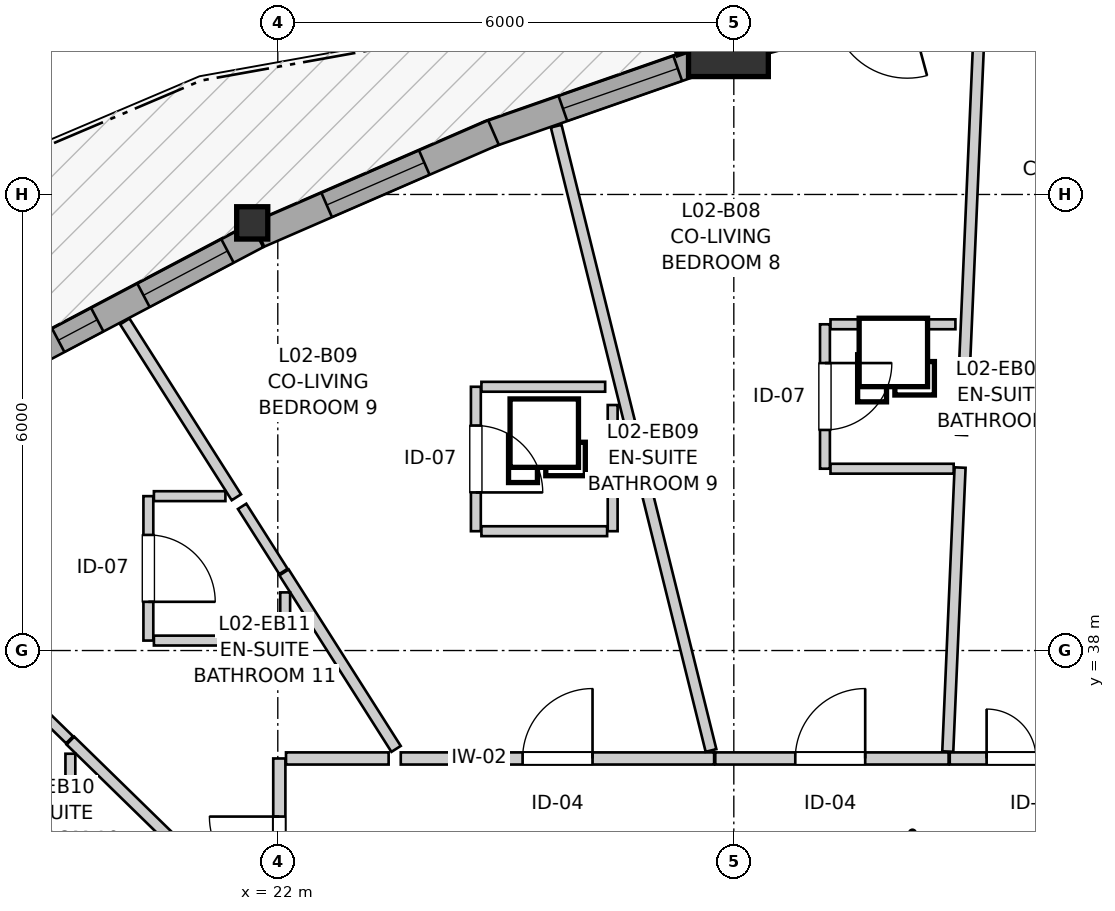
"""IFC4 building model, lengths in metres.
Left out: names, types, materials, properties, quantities, classifications, styles, units other than length and angle.
Written with IfcOpenShell. Run it as: python <this file> out.ifc"""

import sys

from ifc_helpers import new_model, si_unit, direction, frame, frame_2d, origin, origin_2d, place, context, subcontext, project, spatial, rectangle, i_section, extrude, source, transform, mapped, element, fill, save


model = new_model("IFC4")
c1 = context("Model", 3, precision=1e-05, world=origin(), true_north=direction((0.0, 1.0)))
c2 = subcontext(c1, "Body", "Model", "MODEL_VIEW")
j1 = project(units=[si_unit("LENGTHUNIT", "METRE"), si_unit("PLANEANGLEUNIT", "RADIAN")], contexts=[c1])
p1 = place(None, origin())
s1 = spatial("IfcSite", under=j1, at=p1, CompositionType="ELEMENT")
p2 = place(p1, origin())
s2 = spatial("IfcBuilding", under=s1, at=p2, CompositionType="ELEMENT")
p3 = place(p2, frame((0.0, 0.0, 11.0)))
s3 = spatial("IfcBuildingStorey", under=s2, at=p3, CompositionType="ELEMENT", Elevation=11.0)
m1 = source(origin(), c2, "Body", "SweptSolid", [
    extrude(rectangle(XDim=1.05, YDim=1.05, at=origin_2d()), origin(), (0.0, 0.0, 1.0), 2.94),
])
p4 = place(p3, frame((27.929, 46.076, 0.0), z_axis=(0.0, 0.0, 1.0), x_axis=(1.0, 0.0, 0.0)))
e1 = element("IfcColumn", 1, at=p4, inside=s3, PredefinedType="COLUMN", context=c2, shape_type="MappedRepresentation", body=[
    mapped(m1, transform((0.0, 0.0, 0.0), x_axis=(1.0, 0.0, 0.0), y_axis=(0.0, 1.0, 0.0), z_axis=(0.0, 0.0, 1.0), scale=1.0)),
])
m2 = source(origin(), c2, "Body", "SweptSolid", [
    extrude(i_section(OverallWidth=0.409, OverallDepth=0.425, WebThickness=0.03, FlangeThickness=0.048, FilletRadius=0.015, at=origin_2d()), origin(), (0.0, 0.0, 1.0), 2.94),
])
p5 = place(p3, frame((21.664, 43.626, 0.0), z_axis=(0.0, 0.0, 1.0), x_axis=(1.0, 0.0, 0.0)))
e2 = element("IfcColumn", 2, at=p5, inside=s3, PredefinedType="PILASTER", context=c2, shape_type="MappedRepresentation", body=[
    mapped(m2, transform((0.0, 0.0, 0.0), x_axis=(1.0, 0.0, 0.0), y_axis=(0.0, 1.0, 0.0), z_axis=(0.0, 0.0, 1.0), scale=1.0)),
])
p6 = place(p3, frame((31.333, 46.814, 0.0), z_axis=(0.0, 0.0, 1.0), x_axis=(-0.965456905924, -0.260562780926, 0.0)))
e3 = element("IfcWall", 3, at=p6, inside=s3, PredefinedType="SOLIDWALL", context=c2, shape_type="SweptSolid", body=[
    extrude(rectangle(XDim=3.179, YDim=0.35, at=frame_2d((1.59, 0.0))), origin(), (0.0, 0.0, 1.0), 2.42),
])
p7 = place(p6, frame((1.09, 0.0, 0.0)))
e4 = element("IfcOpeningElement", 4, at=p7, cuts=e3, PredefinedType="OPENING", context=c2, shape_type="SweptSolid", body=[
    extrude(rectangle(XDim=1.0, YDim=2.1, at=frame_2d((0.5, 1.05))), frame((0.0, 0.185, 0.0), z_axis=(0.0, -1.0, 0.0), x_axis=(1.0, 0.0, 0.0)), (0.0, 0.0, 1.0), 0.37),
])
p8 = place(p3, frame((27.703, 45.812, 0.0), z_axis=(0.0, 0.0, 1.0), x_axis=(-0.944149283204, -0.329518028377, 0.0)))
e5 = element("IfcWall", 5, at=p8, inside=s3, PredefinedType="SOLIDWALL", context=c2, shape_type="SweptSolid", body=[
    extrude(rectangle(XDim=3.123, YDim=0.35, at=frame_2d((1.562, 0.0))), origin(), (0.0, 0.0, 1.0), 2.42),
])
p9 = place(p8, frame((0.468, 0.0, 0.82)))
e6 = element("IfcOpeningElement", 6, at=p9, cuts=e5, PredefinedType="OPENING", context=c2, shape_type="SweptSolid", body=[
    extrude(rectangle(XDim=1.6, YDim=1.35, at=frame_2d((0.8, 0.675))), frame((0.0, 0.185, 0.0), z_axis=(0.0, -1.0, 0.0), x_axis=(1.0, 0.0, 0.0)), (0.0, 0.0, 1.0), 0.37),
])
p10 = place(p3, frame((24.838, 44.815, 0.0), z_axis=(0.0, 0.0, 1.0), x_axis=(-0.917087357706, -0.398686315712, 0.0)))
e7 = element("IfcWall", 7, at=p10, inside=s3, PredefinedType="SOLIDWALL", context=c2, shape_type="SweptSolid", body=[
    extrude(rectangle(XDim=3.365, YDim=0.35, at=frame_2d((1.683, 0.0))), origin(), (0.0, 0.0, 1.0), 2.42),
])
p11 = place(p10, frame((0.992, 0.0, 0.82)))
e8 = element("IfcOpeningElement", 8, at=p11, cuts=e7, PredefinedType="OPENING", context=c2, shape_type="SweptSolid", body=[
    extrude(rectangle(XDim=1.4, YDim=1.35, at=frame_2d((0.7, 0.675))), frame((0.0, 0.185, 0.0), z_axis=(0.0, -1.0, 0.0), x_axis=(1.0, 0.0, 0.0)), (0.0, 0.0, 1.0), 0.37),
])
p12 = place(p3, frame((21.728, 43.462, 0.0), z_axis=(0.0, 0.0, 1.0), x_axis=(-0.884404833282, -0.466720570435, 0.0)))
e9 = element("IfcWall", 9, at=p12, inside=s3, PredefinedType="SOLIDWALL", context=c2, shape_type="SweptSolid", body=[
    extrude(rectangle(XDim=3.346, YDim=0.35, at=frame_2d((1.673, 0.0))), origin(), (0.0, 0.0, 1.0), 2.42),
])
p13 = place(p12, frame((0.44, 0.0, 0.82)))
e10 = element("IfcOpeningElement", 10, at=p13, cuts=e9, PredefinedType="OPENING", context=c2, shape_type="SweptSolid", body=[
    extrude(rectangle(XDim=1.25, YDim=1.35, at=frame_2d((0.625, 0.675))), frame((0.0, 0.185, 0.0), z_axis=(0.0, -1.0, 0.0), x_axis=(1.0, 0.0, 0.0)), (0.0, 0.0, 1.0), 0.37),
])
p14 = place(p12, frame((2.378, 0.0, 0.82)))
e11 = element("IfcOpeningElement", 11, at=p14, cuts=e9, PredefinedType="OPENING", context=c2, shape_type="SweptSolid", body=[
    extrude(rectangle(XDim=0.58, YDim=1.35, at=frame_2d((0.29, 0.675))), frame((0.0, 0.185, 0.0), z_axis=(0.0, -1.0, 0.0), x_axis=(1.0, 0.0, 0.0)), (0.0, 0.0, 1.0), 0.37),
])
p15 = place(p3, frame((23.618, 36.58, 0.0), z_axis=(0.0, 0.0, 1.0), x_axis=(1.0, 0.0, 0.0)))
e12 = element("IfcWall", 12, at=p15, inside=s3, PredefinedType="PARTITIONING", context=c2, shape_type="SweptSolid", body=[
    extrude(rectangle(XDim=4.123, YDim=0.16, at=frame_2d((2.062, 0.0))), origin(), (0.0, 0.0, 1.0), 2.548),
])
p16 = place(p15, frame((1.603, 0.0, 0.0)))
e13 = element("IfcOpeningElement", 13, at=p16, cuts=e12, PredefinedType="OPENING", context=c2, shape_type="SweptSolid", body=[
    extrude(rectangle(XDim=0.92, YDim=2.1, at=frame_2d((0.46, 1.05))), frame((0.0, 0.09, 0.0), z_axis=(0.0, -1.0, 0.0), x_axis=(1.0, 0.0, 0.0)), (0.0, 0.0, 1.0), 0.18),
])
p17 = place(p3, frame((27.756, 36.58, 0.0), z_axis=(0.0, 0.0, 1.0), x_axis=(1.0, 0.0, 0.0)))
e14 = element("IfcWall", 14, at=p17, inside=s3, PredefinedType="PARTITIONING", context=c2, shape_type="SweptSolid", body=[
    extrude(rectangle(XDim=3.07, YDim=0.16, at=frame_2d((1.535, 0.0))), origin(), (0.0, 0.0, 1.0), 2.94),
])
p18 = place(p17, frame((1.052, 0.0, 0.0)))
e15 = element("IfcOpeningElement", 15, at=p18, cuts=e14, PredefinedType="OPENING", context=c2, shape_type="SweptSolid", body=[
    extrude(rectangle(XDim=0.92, YDim=2.1, at=frame_2d((0.46, 1.05))), frame((0.0, 0.09, 0.0), z_axis=(0.0, -1.0, 0.0), x_axis=(1.0, 0.0, 0.0)), (0.0, 0.0, 1.0), 0.18),
])
p19 = place(p3, frame((22.02, 34.167, 0.0), z_axis=(0.0, 0.0, 1.0), x_axis=(0.0, 1.0, 0.0)))
e16 = element("IfcWall", 16, at=p19, inside=s3, PredefinedType="PARTITIONING", context=c2, shape_type="SweptSolid", body=[
    extrude(rectangle(XDim=2.413, YDim=0.16, at=frame_2d((1.207, 0.0))), origin(), (0.0, 0.0, 1.0), 2.94),
])
p20 = place(p19, frame((0.729, 0.0, 0.0)))
e17 = element("IfcOpeningElement", 17, at=p20, cuts=e16, PredefinedType="OPENING", context=c2, shape_type="SweptSolid", body=[
    extrude(rectangle(XDim=0.92, YDim=2.1, at=frame_2d((0.46, 1.05))), frame((0.0, 0.09, 0.0), z_axis=(0.0, -1.0, 0.0), x_axis=(1.0, 0.0, 0.0)), (0.0, 0.0, 1.0), 0.18),
])
p21 = place(p3, frame((30.841, 36.58, 0.0), z_axis=(0.0, 0.0, 1.0), x_axis=(1.0, 0.0, 0.0)))
e18 = element("IfcWall", 18, at=p21, inside=s3, PredefinedType="PARTITIONING", context=c2, shape_type="SweptSolid", body=[
    extrude(rectangle(XDim=2.316, YDim=0.16, at=frame_2d((1.158, 0.0))), origin(), (0.0, 0.0, 1.0), 2.94),
])
p22 = place(p21, frame((0.485, 0.0, 0.0)))
e19 = element("IfcOpeningElement", 19, at=p22, cuts=e18, PredefinedType="OPENING", context=c2, shape_type="SweptSolid", body=[
    extrude(rectangle(XDim=1.3, YDim=2.1, at=frame_2d((0.65, 1.05))), frame((0.0, 0.09, 0.0), z_axis=(0.0, -1.0, 0.0), x_axis=(1.0, 0.0, 0.0)), (0.0, 0.0, 1.0), 0.18),
])
p23 = place(p3, frame((29.199, 42.292, 0.0), z_axis=(0.0, 0.0, 1.0), x_axis=(0.0, -1.0, 0.0)))
e20 = element("IfcWall", 20, at=p23, inside=s3, PredefinedType="PARTITIONING", context=c2, shape_type="SweptSolid", body=[
    extrude(rectangle(XDim=1.9, YDim=0.13, at=frame_2d((0.95, 0.0))), origin(), (0.0, 0.0, 1.0), 2.94),
])
p24 = place(p23, frame((0.51, 0.0, 0.0)))
e21 = element("IfcOpeningElement", 21, at=p24, cuts=e20, PredefinedType="OPENING", context=c2, shape_type="SweptSolid", body=[
    extrude(rectangle(XDim=0.88, YDim=2.05, at=frame_2d((0.44, 1.025))), frame((0.0, 0.075, 0.0), z_axis=(0.0, -1.0, 0.0), x_axis=(1.0, 0.0, 0.0)), (0.0, 0.0, 1.0), 0.15),
])
p25 = place(p3, frame((24.606, 41.47, 0.0), z_axis=(0.0, 0.0, 1.0), x_axis=(0.0, -1.0, 0.0)))
e22 = element("IfcWall", 22, at=p25, inside=s3, PredefinedType="PARTITIONING", context=c2, shape_type="SweptSolid", body=[
    extrude(rectangle(XDim=1.9, YDim=0.13, at=frame_2d((0.95, 0.0))), origin(), (0.0, 0.0, 1.0), 2.94),
])
p26 = place(p25, frame((0.51, 0.0, 0.0)))
e23 = element("IfcOpeningElement", 23, at=p26, cuts=e22, PredefinedType="OPENING", context=c2, shape_type="SweptSolid", body=[
    extrude(rectangle(XDim=0.88, YDim=2.05, at=frame_2d((0.44, 1.025))), frame((0.0, 0.075, 0.0), z_axis=(0.0, -1.0, 0.0), x_axis=(1.0, 0.0, 0.0)), (0.0, 0.0, 1.0), 0.15),
])
p27 = place(p3, frame((20.297, 40.031, 0.0), z_axis=(0.0, 0.0, 1.0), x_axis=(0.0, -1.0, 0.0)))
e24 = element("IfcWall", 24, at=p27, inside=s3, PredefinedType="PARTITIONING", context=c2, shape_type="SweptSolid", body=[
    extrude(rectangle(XDim=1.9, YDim=0.13, at=frame_2d((0.95, 0.0))), origin(), (0.0, 0.0, 1.0), 2.94),
])
p28 = place(p27, frame((0.51, 0.0, 0.0)))
e25 = element("IfcOpeningElement", 25, at=p28, cuts=e24, PredefinedType="OPENING", context=c2, shape_type="SweptSolid", body=[
    extrude(rectangle(XDim=0.88, YDim=2.05, at=frame_2d((0.44, 1.025))), frame((0.0, 0.075, 0.0), z_axis=(0.0, -1.0, 0.0), x_axis=(1.0, 0.0, 0.0)), (0.0, 0.0, 1.0), 0.15),
])
p29 = place(p3, frame((12.829, 37.479, 0.0), z_axis=(0.0, 0.0, 1.0), x_axis=(0.836435846472, -0.548064845376, 0.0)))
e26 = element("IfcWall", 26, at=p29, inside=s3, PredefinedType="PARTITIONING", context=c2, shape_type="SweptSolid", body=[
    extrude(rectangle(XDim=10.838, YDim=0.145, at=frame_2d((5.419, 0.0))), origin(), (0.0, 0.0, 1.0), 2.94),
])
p30 = place(p3, frame((25.663, 44.899, 0.0), z_axis=(0.0, 0.0, 1.0), x_axis=(0.240695577024, -0.970600658974, 0.0)))
e27 = element("IfcWall", 27, at=p30, inside=s3, PredefinedType="PARTITIONING", context=c2, shape_type="SweptSolid", body=[
    extrude(rectangle(XDim=8.462, YDim=0.145, at=frame_2d((4.231, 0.0))), origin(), (0.0, 0.0, 1.0), 2.94),
])
p31 = place(p3, frame((30.996, 40.836, 0.0), z_axis=(0.0, 0.0, 1.0), x_axis=(0.043354544378, 0.999059749706, 0.0)))
e28 = element("IfcWall", 28, at=p31, inside=s3, PredefinedType="PARTITIONING", context=c2, shape_type="SweptSolid", body=[
    extrude(rectangle(XDim=5.766, YDim=0.145, at=frame_2d((2.883, 0.0))), origin(), (0.0, 0.0, 1.0), 2.94),
])
p32 = place(p3, frame((19.271, 36.815, 0.0), z_axis=(0.0, 0.0, 1.0), x_axis=(0.71551452036, -0.698597860828, 0.0)))
e29 = element("IfcWall", 29, at=p32, inside=s3, PredefinedType="PARTITIONING", context=c2, shape_type="SweptSolid", body=[
    extrude(rectangle(XDim=3.651, YDim=0.145, at=frame_2d((1.826, 0.0))), origin(), (0.0, 0.0, 1.0), 2.308),
])
p33 = place(p3, frame((30.815, 36.671, 0.0), z_axis=(0.0, 0.0, 1.0), x_axis=(0.043352224588, 0.999059850371, 0.0)))
e30 = element("IfcWall", 30, at=p33, inside=s3, PredefinedType="PARTITIONING", context=c2, shape_type="SweptSolid", body=[
    extrude(rectangle(XDim=3.739, YDim=0.145, at=frame_2d((1.87, 0.0))), origin(), (0.0, 0.0, 1.0), 2.94),
])
p34 = place(p3, frame((22.082, 39.028, 0.0), z_axis=(0.0, 0.0, 1.0), x_axis=(0.535944885386, -0.844252971465, 0.0)))
e31 = element("IfcWall", 31, at=p34, inside=s3, PredefinedType="PARTITIONING", context=c2, shape_type="SweptSolid", body=[
    extrude(rectangle(XDim=2.751, YDim=0.145, at=frame_2d((1.375, 0.0))), origin(), (0.0, 0.0, 1.0), 2.94),
])
p35 = place(p3, frame((19.987, 42.33, 0.0), z_axis=(0.0, 0.0, 1.0), x_axis=(0.535808561115, -0.844339496788, 0.0)))
e32 = element("IfcWall", 32, at=p35, inside=s3, PredefinedType="PARTITIONING", context=c2, shape_type="SweptSolid", body=[
    extrude(rectangle(XDim=2.74, YDim=0.145, at=frame_2d((1.37, 0.0))), origin(), (0.0, 0.0, 1.0), 2.94),
])
p36 = place(p3, frame((26.406, 39.57, 0.0), z_axis=(0.0, 0.0, 1.0), x_axis=(0.0, 1.0, 0.0)))
e33 = element("IfcWall", 33, at=p36, inside=s3, PredefinedType="PARTITIONING", context=c2, shape_type="SweptSolid", body=[
    extrude(rectangle(XDim=1.66, YDim=0.13, at=frame_2d((0.83, 0.0))), origin(), (0.0, 0.0, 1.0), 2.94),
])
p37 = place(p3, frame((17.544, 36.125, 0.0), z_axis=(0.0, 0.0, 1.0), x_axis=(1.0, 0.0, 0.0)))
e34 = element("IfcWall", 34, at=p37, inside=s3, PredefinedType="PARTITIONING", context=c2, shape_type="SweptSolid", body=[
    extrude(rectangle(XDim=1.727, YDim=0.13, at=frame_2d((0.864, 0.0))), origin(), (0.0, 0.0, 1.0), 2.94),
])
p38 = place(p3, frame((20.37, 38.131, 0.0), z_axis=(0.0, 0.0, 1.0), x_axis=(1.0, 0.0, 0.0)))
e35 = element("IfcWall", 35, at=p38, inside=s3, PredefinedType="PARTITIONING", context=c2, shape_type="SweptSolid", body=[
    extrude(rectangle(XDim=1.727, YDim=0.13, at=frame_2d((0.863, 0.0))), origin(), (0.0, 0.0, 1.0), 2.94),
])
p39 = place(p3, frame((29.272, 42.292, 0.0), z_axis=(0.0, 0.0, 1.0), x_axis=(1.0, 0.0, 0.0)))
e36 = element("IfcWall", 36, at=p39, inside=s3, PredefinedType="PARTITIONING", context=c2, shape_type="SweptSolid", body=[
    extrude(rectangle(XDim=1.644, YDim=0.13, at=frame_2d((0.822, 0.0))), origin(), (0.0, 0.0, 1.0), 2.508),
])
p40 = place(p3, frame((24.679, 41.47, 0.0), z_axis=(0.0, 0.0, 1.0), x_axis=(1.0, 0.0, 0.0)))
e37 = element("IfcWall", 37, at=p40, inside=s3, PredefinedType="PARTITIONING", context=c2, shape_type="SweptSolid", body=[
    extrude(rectangle(XDim=1.628, YDim=0.13, at=frame_2d((0.814, 0.0))), origin(), (0.0, 0.0, 1.0), 2.508),
])
p41 = place(p3, frame((24.679, 39.57, 0.0), z_axis=(0.0, 0.0, 1.0), x_axis=(1.0, 0.0, 0.0)))
e38 = element("IfcWall", 38, at=p41, inside=s3, PredefinedType="PARTITIONING", context=c2, shape_type="SweptSolid", body=[
    extrude(rectangle(XDim=1.654, YDim=0.13, at=frame_2d((0.827, 0.0))), origin(), (0.0, 0.0, 1.0), 2.94),
])
p42 = place(p3, frame((29.272, 40.392, 0.0), z_axis=(0.0, 0.0, 1.0), x_axis=(1.0, 0.0, 0.0)))
e39 = element("IfcWall", 39, at=p42, inside=s3, PredefinedType="PARTITIONING", context=c2, shape_type="SweptSolid", body=[
    extrude(rectangle(XDim=1.621, YDim=0.13, at=frame_2d((0.81, 0.0))), origin(), (0.0, 0.0, 1.0), 2.94),
])
p43 = place(p3, frame((18.042, 38.014, 0.0), z_axis=(0.0, 0.0, 1.0), x_axis=(0.715729497461, -0.698377610225, 0.0)))
e40 = element("IfcWall", 40, at=p43, inside=s3, PredefinedType="PARTITIONING", context=c2, shape_type="SweptSolid", body=[
    extrude(rectangle(XDim=1.702, YDim=0.13, at=frame_2d((0.851, 0.0))), origin(), (0.0, 0.0, 1.0), 2.308),
])
p44 = place(p3, frame((22.108, 36.58, 0.0), z_axis=(0.0, 0.0, 1.0), x_axis=(1.0, 0.0, 0.0)))
e41 = element("IfcWall", 41, at=p44, inside=s3, PredefinedType="PARTITIONING", context=c2, shape_type="SweptSolid", body=[
    extrude(rectangle(XDim=1.35, YDim=0.16, at=frame_2d((0.675, 0.0))), origin(), (0.0, 0.0, 1.0), 2.94),
])
p45 = place(p3, frame((20.37, 40.031, 0.0), z_axis=(0.0, 0.0, 1.0), x_axis=(1.0, 0.0, 0.0)))
e42 = element("IfcWall", 42, at=p45, inside=s3, PredefinedType="PARTITIONING", context=c2, shape_type="SweptSolid", body=[
    extrude(rectangle(XDim=0.941, YDim=0.13, at=frame_2d((0.47, 0.0))), origin(), (0.0, 0.0, 1.0), 2.94),
])
p46 = place(p3, frame((21.531, 39.897, 0.0), z_axis=(0.0, 0.0, 1.0), x_axis=(0.536002688679, -0.844216274262, 0.0)))
e43 = element("IfcWall", 43, at=p46, inside=s3, PredefinedType="PARTITIONING", context=c2, shape_type="SweptSolid", body=[
    extrude(rectangle(XDim=1.014, YDim=0.13, at=frame_2d((0.507, 0.0))), origin(), (0.0, 0.0, 1.0), 2.94),
])
p47 = place(p3, frame((22.097, 38.204, 0.0), z_axis=(0.0, 0.0, 1.0), x_axis=(0.0, 1.0, 0.0)))
e44 = element("IfcWall", 44, at=p47, inside=s3, PredefinedType="PARTITIONING", context=c2, shape_type="SweptSolid", body=[
    extrude(rectangle(XDim=0.561, YDim=0.13, at=frame_2d((0.28, 0.0))), origin(), (0.0, 0.0, 1.0), 2.94),
])
p48 = place(p3, frame((19.271, 36.198, 0.0), z_axis=(0.0, 0.0, 1.0), x_axis=(0.0, 1.0, 0.0)))
e45 = element("IfcWall", 45, at=p48, inside=s3, PredefinedType="PARTITIONING", context=c2, shape_type="SweptSolid", body=[
    extrude(rectangle(XDim=0.444, YDim=0.13, at=frame_2d((0.222, 0.0))), origin(), (0.0, 0.0, 1.0), 2.94),
])
m3 = source(origin(), c2, "Body", "SweptSolid", [
    extrude(rectangle(XDim=1.6, YDim=1.35, at=frame_2d((0.8, 0.675))), frame((0.0, 0.03, 0.0), z_axis=(0.0, -1.0, 0.0), x_axis=(1.0, 0.0, 0.0)), (0.0, 0.0, 1.0), 0.06),
])
p49 = place(p9, origin())
e46 = element("IfcWindow", 46, at=p49, inside=s3, PartitioningType="SINGLE_PANEL", PredefinedType="WINDOW", context=c2, shape_type="MappedRepresentation", body=[
    mapped(m3, transform((0.0, 0.0, 0.0), x_axis=(1.0, 0.0, 0.0), y_axis=(0.0, 1.0, 0.0), z_axis=(0.0, 0.0, 1.0), scale=1.0)),
])
fill(e6, e46)
m4 = source(origin(), c2, "Body", "SweptSolid", [
    extrude(rectangle(XDim=1.4, YDim=1.35, at=frame_2d((0.7, 0.675))), frame((0.0, 0.03, 0.0), z_axis=(0.0, -1.0, 0.0), x_axis=(1.0, 0.0, 0.0)), (0.0, 0.0, 1.0), 0.06),
])
p50 = place(p11, origin())
e47 = element("IfcWindow", 47, at=p50, inside=s3, PartitioningType="SINGLE_PANEL", PredefinedType="WINDOW", context=c2, shape_type="MappedRepresentation", body=[
    mapped(m4, transform((0.0, 0.0, 0.0), x_axis=(1.0, 0.0, 0.0), y_axis=(0.0, 1.0, 0.0), z_axis=(0.0, 0.0, 1.0), scale=1.0)),
])
fill(e8, e47)
m5 = source(origin(), c2, "Body", "SweptSolid", [
    extrude(rectangle(XDim=1.25, YDim=1.35, at=frame_2d((0.625, 0.675))), frame((0.0, 0.03, 0.0), z_axis=(0.0, -1.0, 0.0), x_axis=(1.0, 0.0, 0.0)), (0.0, 0.0, 1.0), 0.06),
])
p51 = place(p13, origin())
e48 = element("IfcWindow", 48, at=p51, inside=s3, PartitioningType="SINGLE_PANEL", PredefinedType="WINDOW", context=c2, shape_type="MappedRepresentation", body=[
    mapped(m5, transform((0.0, 0.0, 0.0), x_axis=(1.0, 0.0, 0.0), y_axis=(0.0, 1.0, 0.0), z_axis=(0.0, 0.0, 1.0), scale=1.0)),
])
fill(e10, e48)
m6 = source(origin(), c2, "Body", "SweptSolid", [
    extrude(rectangle(XDim=0.58, YDim=1.35, at=frame_2d((0.29, 0.675))), frame((0.0, 0.03, 0.0), z_axis=(0.0, -1.0, 0.0), x_axis=(1.0, 0.0, 0.0)), (0.0, 0.0, 1.0), 0.06),
])
p52 = place(p14, origin())
e49 = element("IfcWindow", 49, at=p52, inside=s3, PartitioningType="SINGLE_PANEL", PredefinedType="WINDOW", context=c2, shape_type="MappedRepresentation", body=[
    mapped(m6, transform((0.0, 0.0, 0.0), x_axis=(1.0, 0.0, 0.0), y_axis=(0.0, 1.0, 0.0), z_axis=(0.0, 0.0, 1.0), scale=1.0)),
])
fill(e11, e49)
m7 = source(origin(), c2, "Body", "SweptSolid", [
    extrude(rectangle(XDim=0.92, YDim=2.1, at=frame_2d((0.46, 1.05))), frame((0.0, 0.025, 0.0), z_axis=(0.0, -1.0, 0.0), x_axis=(1.0, 0.0, 0.0)), (0.0, 0.0, 1.0), 0.05),
])
p53 = place(p16, origin())
e50 = element("IfcDoor", 50, at=p53, inside=s3, OperationType="SINGLE_SWING_RIGHT", PredefinedType="DOOR", context=c2, shape_type="MappedRepresentation", body=[
    mapped(m7, transform((0.0, 0.0, 0.0), x_axis=(1.0, 0.0, 0.0), y_axis=(0.0, 1.0, 0.0), z_axis=(0.0, 0.0, 1.0), scale=1.0)),
])
fill(e13, e50)
p54 = place(p18, origin())
e51 = element("IfcDoor", 51, at=p54, inside=s3, OperationType="SINGLE_SWING_RIGHT", PredefinedType="DOOR", context=c2, shape_type="MappedRepresentation", body=[
    mapped(m7, transform((0.0, 0.0, 0.0), x_axis=(1.0, 0.0, 0.0), y_axis=(0.0, 1.0, 0.0), z_axis=(0.0, 0.0, 1.0), scale=1.0)),
])
fill(e15, e51)
p55 = place(p20, origin())
e52 = element("IfcDoor", 52, at=p55, inside=s3, OperationType="SINGLE_SWING_RIGHT", PredefinedType="DOOR", context=c2, shape_type="MappedRepresentation", body=[
    mapped(m7, transform((0.0, 0.0, 0.0), x_axis=(1.0, 0.0, 0.0), y_axis=(0.0, 1.0, 0.0), z_axis=(0.0, 0.0, 1.0), scale=1.0)),
])
fill(e17, e52)
m8 = source(origin(), c2, "Body", "SweptSolid", [
    extrude(rectangle(XDim=1.3, YDim=2.1, at=frame_2d((0.65, 1.05))), frame((0.0, 0.025, 0.0), z_axis=(0.0, -1.0, 0.0), x_axis=(1.0, 0.0, 0.0)), (0.0, 0.0, 1.0), 0.05),
])
p56 = place(p22, origin())
e53 = element("IfcDoor", 53, at=p56, inside=s3, OperationType="DOUBLE_DOOR_SINGLE_SWING", PredefinedType="DOOR", context=c2, shape_type="MappedRepresentation", body=[
    mapped(m8, transform((0.0, 0.0, 0.0), x_axis=(1.0, 0.0, 0.0), y_axis=(0.0, 1.0, 0.0), z_axis=(0.0, 0.0, 1.0), scale=1.0)),
])
fill(e19, e53)
m9 = source(origin(), c2, "Body", "SweptSolid", [
    extrude(rectangle(XDim=0.88, YDim=2.05, at=frame_2d((0.44, 1.025))), frame((0.0, 0.025, 0.0), z_axis=(0.0, -1.0, 0.0), x_axis=(1.0, 0.0, 0.0)), (0.0, 0.0, 1.0), 0.05),
])
p57 = place(p24, origin())
e54 = element("IfcDoor", 54, at=p57, inside=s3, OperationType="SINGLE_SWING_LEFT", PredefinedType="DOOR", context=c2, shape_type="MappedRepresentation", body=[
    mapped(m9, transform((0.0, 0.0, 0.0), x_axis=(1.0, 0.0, 0.0), y_axis=(0.0, 1.0, 0.0), z_axis=(0.0, 0.0, 1.0), scale=1.0)),
])
fill(e21, e54)
p58 = place(p26, origin())
e55 = element("IfcDoor", 55, at=p58, inside=s3, OperationType="SINGLE_SWING_RIGHT", PredefinedType="DOOR", context=c2, shape_type="MappedRepresentation", body=[
    mapped(m9, transform((0.0, 0.0, 0.0), x_axis=(1.0, 0.0, 0.0), y_axis=(0.0, 1.0, 0.0), z_axis=(0.0, 0.0, 1.0), scale=1.0)),
])
fill(e23, e55)
p59 = place(p28, origin())
e56 = element("IfcDoor", 56, at=p59, inside=s3, OperationType="SINGLE_SWING_RIGHT", PredefinedType="DOOR", context=c2, shape_type="MappedRepresentation", body=[
    mapped(m9, transform((0.0, 0.0, 0.0), x_axis=(1.0, 0.0, 0.0), y_axis=(0.0, 1.0, 0.0), z_axis=(0.0, 0.0, 1.0), scale=1.0)),
])
fill(e25, e56)
save(model, sys.argv[1])
